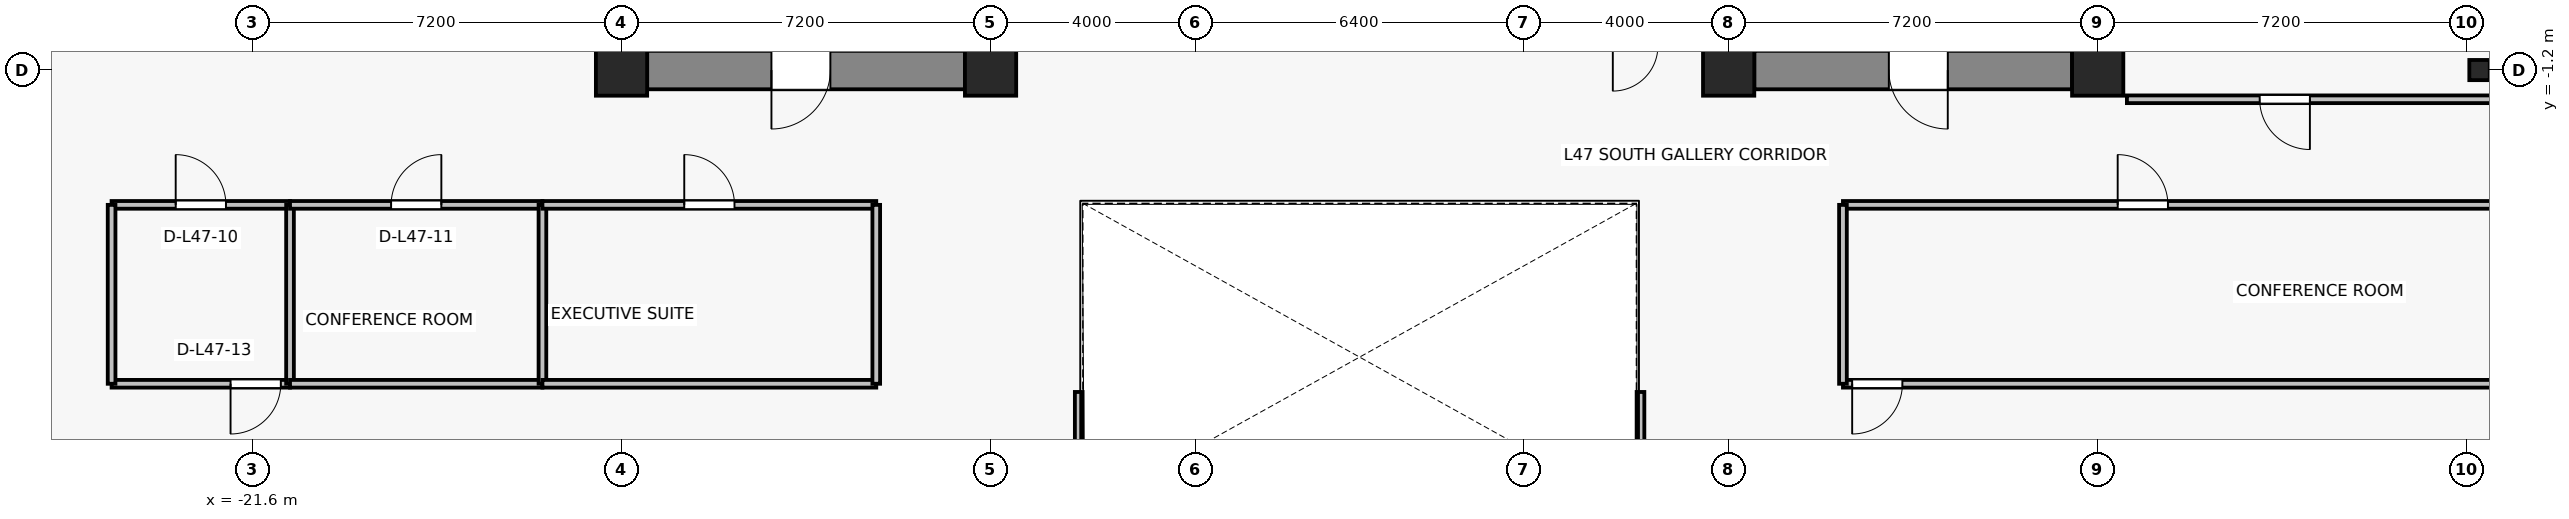
"""IFC4 building model, lengths in metres.
Left out: names, types, materials, properties, quantities, classifications, styles, units other than length and angle.
Written with IfcOpenShell. Run it as: python <this file> out.ifc"""

import sys

from ifc_helpers import new_model, si_unit, direction, frame, frame_2d, origin, origin_2d, place, context, subcontext, project, spatial, rectangle, i_section, extrude, source, transform, mapped, element, fill, save


model = new_model("IFC4")
c1 = context("Model", 3, precision=1e-05, world=origin(), true_north=direction((0.0, 1.0)))
c2 = subcontext(c1, "Body", "Model", "MODEL_VIEW")
j1 = project(units=[si_unit("LENGTHUNIT", "METRE"), si_unit("PLANEANGLEUNIT", "RADIAN")], contexts=[c1])
p1 = place(None, origin())
s1 = spatial("IfcSite", under=j1, at=p1, CompositionType="ELEMENT")
p2 = place(p1, origin())
s2 = spatial("IfcBuilding", under=s1, at=p2, CompositionType="ELEMENT")
p3 = place(p2, frame((0.0, 0.0, 169.3)))
s3 = spatial("IfcBuildingStorey", under=s2, at=p3, CompositionType="ELEMENT", Elevation=169.3)
for number, where, z_axis, x_axis in (
    (1, (-14.4, -1.2, 0.0), (0.0, 0.0, 1.0), (1.0, 0.0, 0.0)),
    (2, (-7.2, -1.2, 0.0), (0.0, 0.0, 1.0), (1.0, 0.0, 0.0)),
    (3, (7.2, -1.2, 0.0), (0.0, 0.0, 1.0), (1.0, 0.0, 0.0)),
    (4, (14.4, -1.2, 0.0), (0.0, 0.0, 1.0), (1.0, 0.0, 0.0)),
):
    element("IfcColumn", number, at=place(p3, frame(where, z_axis=z_axis, x_axis=x_axis)), inside=s3, PredefinedType="COLUMN", context=c2, shape_type="SweptSolid", body=[
        extrude(rectangle(XDim=1.0, YDim=1.0, at=origin_2d()), origin(), (0.0, 0.0, 1.0), 3.3),
    ])
p4 = place(p3, frame((21.85, -1.2, 0.0), z_axis=(0.0, 0.0, 1.0), x_axis=(1.0, 0.0, 0.0)))
e5 = element("IfcColumn", 5, at=p4, inside=s3, PredefinedType="COLUMN", context=c2, shape_type="SweptSolid", body=[
    extrude(i_section(OverallWidth=0.399, OverallDepth=0.394, WebThickness=0.023, FlangeThickness=0.037, FilletRadius=0.015, at=origin_2d()), origin(), (0.0, 0.0, 1.0), 3.3),
])
p5 = place(p3, frame((-7.7, -1.2, 0.0), z_axis=(0.0, 0.0, 1.0), x_axis=(-1.0, 0.0, 0.0)))
e6 = element("IfcWall", 6, at=p5, inside=s3, PredefinedType="SHEAR", context=c2, shape_type="SweptSolid", body=[
    extrude(rectangle(XDim=6.2, YDim=0.75, at=frame_2d((3.1, 0.0))), origin(), (0.0, 0.0, 1.0), 3.075),
])
p6 = place(p5, frame((2.625, 0.0, 0.0)))
e7 = element("IfcOpeningElement", 7, at=p6, cuts=e6, PredefinedType="OPENING", context=c2, shape_type="SweptSolid", body=[
    extrude(rectangle(XDim=1.15, YDim=2.15, at=frame_2d((0.575, 1.075))), frame((0.0, 0.385, 0.0), z_axis=(0.0, -1.0, 0.0), x_axis=(1.0, 0.0, 0.0)), (0.0, 0.0, 1.0), 0.77),
])
p7 = place(p3, frame((13.9, -1.2, 0.0), z_axis=(0.0, 0.0, 1.0), x_axis=(-1.0, 0.0, 0.0)))
e8 = element("IfcWall", 8, at=p7, inside=s3, PredefinedType="SHEAR", context=c2, shape_type="SweptSolid", body=[
    extrude(rectangle(XDim=6.2, YDim=0.75, at=frame_2d((3.1, 0.0))), origin(), (0.0, 0.0, 1.0), 3.075),
])
p8 = place(p7, frame((2.425, 0.0, 0.0)))
e9 = element("IfcOpeningElement", 9, at=p8, cuts=e8, PredefinedType="OPENING", context=c2, shape_type="SweptSolid", body=[
    extrude(rectangle(XDim=1.15, YDim=2.15, at=frame_2d((0.575, 1.075))), frame((0.0, 0.385, 0.0), z_axis=(0.0, -1.0, 0.0), x_axis=(1.0, 0.0, 0.0)), (0.0, 0.0, 1.0), 0.77),
])
p9 = place(p3, frame((-20.868, -7.32, 0.0), z_axis=(0.0, 0.0, 1.0), x_axis=(-1.0, 0.0, 0.0)))
e10 = element("IfcWall", 10, at=p9, inside=s3, PredefinedType="PARTITIONING", context=c2, shape_type="SweptSolid", body=[
    extrude(rectangle(XDim=3.481, YDim=0.15, at=frame_2d((1.74, 0.0))), origin(), (0.0, 0.0, 1.0), 2.565),
])
p10 = place(p9, frame((0.18, 0.0, 0.0)))
e11 = element("IfcOpeningElement", 11, at=p10, cuts=e10, PredefinedType="OPENING", context=c2, shape_type="SweptSolid", body=[
    extrude(rectangle(XDim=0.98, YDim=2.15, at=frame_2d((0.49, 1.075))), frame((0.0, 0.085, 0.0), z_axis=(0.0, -1.0, 0.0), x_axis=(1.0, 0.0, 0.0)), (0.0, 0.0, 1.0), 0.17),
])
p11 = place(p3, frame((-24.349, -3.83, 0.0), z_axis=(0.0, 0.0, 1.0), x_axis=(1.0, 0.0, 0.0)))
e12 = element("IfcWall", 12, at=p11, inside=s3, PredefinedType="PARTITIONING", context=c2, shape_type="SweptSolid", body=[
    extrude(rectangle(XDim=3.481, YDim=0.15, at=frame_2d((1.74, 0.0))), origin(), (0.0, 0.0, 1.0), 2.565),
])
p12 = place(p11, frame((1.25, 0.0, 0.0)))
e13 = element("IfcOpeningElement", 13, at=p12, cuts=e12, PredefinedType="OPENING", context=c2, shape_type="SweptSolid", body=[
    extrude(rectangle(XDim=0.98, YDim=2.15, at=frame_2d((0.49, 1.075))), frame((0.0, 0.085, 0.0), z_axis=(0.0, -1.0, 0.0), x_axis=(1.0, 0.0, 0.0)), (0.0, 0.0, 1.0), 0.17),
])
p13 = place(p3, frame((-24.349, -7.32, 0.0), z_axis=(0.0, 0.0, 1.0), x_axis=(0.0, 1.0, 0.0)))
e14 = element("IfcWall", 14, at=p13, inside=s3, PredefinedType="PARTITIONING", context=c2, shape_type="SweptSolid", body=[
    extrude(rectangle(XDim=3.49, YDim=0.15, at=frame_2d((1.745, 0.0))), origin(), (0.0, 0.0, 1.0), 3.075),
])
p14 = place(p3, frame((-20.868, -3.83, 0.0), z_axis=(0.0, 0.0, 1.0), x_axis=(0.0, -1.0, 0.0)))
e15 = element("IfcWall", 15, at=p14, inside=s3, PredefinedType="PARTITIONING", context=c2, shape_type="SweptSolid", body=[
    extrude(rectangle(XDim=3.49, YDim=0.15, at=frame_2d((1.745, 0.0))), origin(), (0.0, 0.0, 1.0), 2.665),
])
p15 = place(p3, frame((-15.943, -7.32, 0.0), z_axis=(0.0, 0.0, 1.0), x_axis=(-1.0, 0.0, 0.0)))
e16 = element("IfcWall", 16, at=p15, inside=s3, PredefinedType="PARTITIONING", context=c2, shape_type="SweptSolid", body=[
    extrude(rectangle(XDim=4.925, YDim=0.15, at=frame_2d((2.462, 0.0))), origin(), (0.0, 0.0, 1.0), 3.075),
])
p16 = place(p3, frame((-20.868, -3.83, 0.0), z_axis=(0.0, 0.0, 1.0), x_axis=(1.0, 0.0, 0.0)))
e17 = element("IfcWall", 17, at=p16, inside=s3, PredefinedType="PARTITIONING", context=c2, shape_type="SweptSolid", body=[
    extrude(rectangle(XDim=4.925, YDim=0.15, at=frame_2d((2.462, 0.0))), origin(), (0.0, 0.0, 1.0), 3.075),
])
p17 = place(p16, frame((1.973, 0.0, 0.0)))
e18 = element("IfcOpeningElement", 18, at=p17, cuts=e17, PredefinedType="OPENING", context=c2, shape_type="SweptSolid", body=[
    extrude(rectangle(XDim=0.98, YDim=2.15, at=frame_2d((0.49, 1.075))), frame((0.0, 0.085, 0.0), z_axis=(0.0, -1.0, 0.0), x_axis=(1.0, 0.0, 0.0)), (0.0, 0.0, 1.0), 0.17),
])
p18 = place(p3, frame((-15.943, -3.83, 0.0), z_axis=(0.0, 0.0, 1.0), x_axis=(0.0, -1.0, 0.0)))
e19 = element("IfcWall", 19, at=p18, inside=s3, PredefinedType="PARTITIONING", context=c2, shape_type="SweptSolid", body=[
    extrude(rectangle(XDim=3.49, YDim=0.15, at=frame_2d((1.745, 0.0))), origin(), (0.0, 0.0, 1.0), 2.665),
])
p19 = place(p3, frame((-9.43, -7.32, 0.0), z_axis=(0.0, 0.0, 1.0), x_axis=(-1.0, 0.0, 0.0)))
e20 = element("IfcWall", 20, at=p19, inside=s3, PredefinedType="PARTITIONING", context=c2, shape_type="SweptSolid", body=[
    extrude(rectangle(XDim=6.513, YDim=0.15, at=frame_2d((3.257, 0.0))), origin(), (0.0, 0.0, 1.0), 2.565),
])
p20 = place(p3, frame((-15.943, -3.83, 0.0), z_axis=(0.0, 0.0, 1.0), x_axis=(1.0, 0.0, 0.0)))
e21 = element("IfcWall", 21, at=p20, inside=s3, PredefinedType="PARTITIONING", context=c2, shape_type="SweptSolid", body=[
    extrude(rectangle(XDim=6.513, YDim=0.15, at=frame_2d((3.257, 0.0))), origin(), (0.0, 0.0, 1.0), 2.565),
])
p21 = place(p20, frame((2.767, 0.0, 0.0)))
e22 = element("IfcOpeningElement", 22, at=p21, cuts=e21, PredefinedType="OPENING", context=c2, shape_type="SweptSolid", body=[
    extrude(rectangle(XDim=0.98, YDim=2.15, at=frame_2d((0.49, 1.075))), frame((0.0, 0.085, 0.0), z_axis=(0.0, -1.0, 0.0), x_axis=(1.0, 0.0, 0.0)), (0.0, 0.0, 1.0), 0.17),
])
p22 = place(p3, frame((-9.43, -3.83, 0.0), z_axis=(0.0, 0.0, 1.0), x_axis=(0.0, -1.0, 0.0)))
e23 = element("IfcWall", 23, at=p22, inside=s3, PredefinedType="PARTITIONING", context=c2, shape_type="SweptSolid", body=[
    extrude(rectangle(XDim=3.49, YDim=0.15, at=frame_2d((1.745, 0.0))), origin(), (0.0, 0.0, 1.0), 2.665),
])
p23 = place(p3, frame((-5.48, -7.48, 0.0), z_axis=(0.0, 0.0, 1.0), x_axis=(0.0, -1.0, 0.0)))
e24 = element("IfcWall", 24, at=p23, inside=s3, PredefinedType="PARTITIONING", context=c2, shape_type="SweptSolid", body=[
    extrude(rectangle(XDim=9.85, YDim=0.15, at=frame_2d((4.925, 0.0))), origin(), (0.0, 0.0, 1.0), 2.565),
])
p24 = place(p3, frame((22.53, -7.32, 0.0), z_axis=(0.0, 0.0, 1.0), x_axis=(-1.0, 0.0, 0.0)))
e25 = element("IfcWall", 25, at=p24, inside=s3, PredefinedType="PARTITIONING", context=c2, shape_type="SweptSolid", body=[
    extrude(rectangle(XDim=13.1, YDim=0.15, at=frame_2d((6.55, 0.0))), origin(), (0.0, 0.0, 1.0), 2.565),
])
p25 = place(p24, frame((11.94, 0.0, 0.0)))
e26 = element("IfcOpeningElement", 26, at=p25, cuts=e25, PredefinedType="OPENING", context=c2, shape_type="SweptSolid", body=[
    extrude(rectangle(XDim=0.98, YDim=2.15, at=frame_2d((0.49, 1.075))), frame((0.0, 0.085, 0.0), z_axis=(0.0, -1.0, 0.0), x_axis=(1.0, 0.0, 0.0)), (0.0, 0.0, 1.0), 0.17),
])
p26 = place(p3, frame((9.43, -3.83, 0.0), z_axis=(0.0, 0.0, 1.0), x_axis=(1.0, 0.0, 0.0)))
e27 = element("IfcWall", 27, at=p26, inside=s3, PredefinedType="PARTITIONING", context=c2, shape_type="SweptSolid", body=[
    extrude(rectangle(XDim=13.1, YDim=0.15, at=frame_2d((6.55, 0.0))), origin(), (0.0, 0.0, 1.0), 2.565),
])
p27 = place(p26, frame((5.36, 0.0, 0.0)))
e28 = element("IfcOpeningElement", 28, at=p27, cuts=e27, PredefinedType="OPENING", context=c2, shape_type="SweptSolid", body=[
    extrude(rectangle(XDim=0.98, YDim=2.15, at=frame_2d((0.49, 1.075))), frame((0.0, 0.085, 0.0), z_axis=(0.0, -1.0, 0.0), x_axis=(1.0, 0.0, 0.0)), (0.0, 0.0, 1.0), 0.17),
])
p28 = place(p3, frame((9.43, -7.32, 0.0), z_axis=(0.0, 0.0, 1.0), x_axis=(0.0, 1.0, 0.0)))
e29 = element("IfcWall", 29, at=p28, inside=s3, PredefinedType="PARTITIONING", context=c2, shape_type="SweptSolid", body=[
    extrude(rectangle(XDim=3.49, YDim=0.15, at=frame_2d((1.745, 0.0))), origin(), (0.0, 0.0, 1.0), 2.665),
])
p29 = place(p3, frame((5.48, -17.33, 0.0), z_axis=(0.0, 0.0, 1.0), x_axis=(0.0, 1.0, 0.0)))
e30 = element("IfcWall", 30, at=p29, inside=s3, PredefinedType="PARTITIONING", context=c2, shape_type="SweptSolid", body=[
    extrude(rectangle(XDim=9.85, YDim=0.15, at=frame_2d((4.925, 0.0))), origin(), (0.0, 0.0, 1.0), 2.565),
])
p30 = place(p3, frame((22.53, -1.77, 0.0), z_axis=(0.0, 0.0, 1.0), x_axis=(-1.0, 0.0, 0.0)))
e31 = element("IfcWall", 31, at=p30, inside=s3, PredefinedType="PARTITIONING", context=c2, shape_type="SweptSolid", body=[
    extrude(rectangle(XDim=7.56, YDim=0.15, at=frame_2d((3.78, 0.0))), origin(), (0.0, 0.0, 1.0), 3.075),
])
p31 = place(p30, frame((3.99, 0.0, 0.0)))
e32 = element("IfcOpeningElement", 32, at=p31, cuts=e31, PredefinedType="OPENING", context=c2, shape_type="SweptSolid", body=[
    extrude(rectangle(XDim=0.98, YDim=2.15, at=frame_2d((0.49, 1.075))), frame((0.0, 0.085, 0.0), z_axis=(0.0, -1.0, 0.0), x_axis=(1.0, 0.0, 0.0)), (0.0, 0.0, 1.0), 0.17),
])
m1 = source(origin(), c2, "Body", "SweptSolid", [
    extrude(rectangle(XDim=1.15, YDim=2.15, at=frame_2d((0.575, 1.075))), frame((0.0, 0.025, 0.0), z_axis=(0.0, -1.0, 0.0), x_axis=(1.0, 0.0, 0.0)), (0.0, 0.0, 1.0), 0.05),
])
p32 = place(p6, origin())
e33 = element("IfcDoor", 33, at=p32, inside=s3, OperationType="SINGLE_SWING_RIGHT", PredefinedType="DOOR", context=c2, shape_type="MappedRepresentation", body=[
    mapped(m1, transform((0.0, 0.0, 0.0), x_axis=(1.0, 0.0, 0.0), y_axis=(0.0, 1.0, 0.0), z_axis=(0.0, 0.0, 1.0), scale=1.0)),
])
fill(e7, e33)
p33 = place(p8, origin())
e34 = element("IfcDoor", 34, at=p33, inside=s3, OperationType="SINGLE_SWING_LEFT", PredefinedType="DOOR", context=c2, shape_type="MappedRepresentation", body=[
    mapped(m1, transform((0.0, 0.0, 0.0), x_axis=(1.0, 0.0, 0.0), y_axis=(0.0, 1.0, 0.0), z_axis=(0.0, 0.0, 1.0), scale=1.0)),
])
fill(e9, e34)
m2 = source(origin(), c2, "Body", "SweptSolid", [
    extrude(rectangle(XDim=0.98, YDim=2.15, at=frame_2d((0.49, 1.075))), frame((0.0, 0.025, 0.0), z_axis=(0.0, -1.0, 0.0), x_axis=(1.0, 0.0, 0.0)), (0.0, 0.0, 1.0), 0.05),
])
p34 = place(p12, origin())
e35 = element("IfcDoor", 35, at=p34, inside=s3, OperationType="SINGLE_SWING_LEFT", PredefinedType="DOOR", context=c2, shape_type="MappedRepresentation", body=[
    mapped(m2, transform((0.0, 0.0, 0.0), x_axis=(1.0, 0.0, 0.0), y_axis=(0.0, 1.0, 0.0), z_axis=(0.0, 0.0, 1.0), scale=1.0)),
])
fill(e13, e35)
p35 = place(p17, origin())
e36 = element("IfcDoor", 36, at=p35, inside=s3, OperationType="SINGLE_SWING_RIGHT", PredefinedType="DOOR", context=c2, shape_type="MappedRepresentation", body=[
    mapped(m2, transform((0.0, 0.0, 0.0), x_axis=(1.0, 0.0, 0.0), y_axis=(0.0, 1.0, 0.0), z_axis=(0.0, 0.0, 1.0), scale=1.0)),
])
fill(e18, e36)
p36 = place(p21, origin())
e37 = element("IfcDoor", 37, at=p36, inside=s3, OperationType="SINGLE_SWING_LEFT", PredefinedType="DOOR", context=c2, shape_type="MappedRepresentation", body=[
    mapped(m2, transform((0.0, 0.0, 0.0), x_axis=(1.0, 0.0, 0.0), y_axis=(0.0, 1.0, 0.0), z_axis=(0.0, 0.0, 1.0), scale=1.0)),
])
fill(e22, e37)
p37 = place(p10, origin())
e38 = element("IfcDoor", 38, at=p37, inside=s3, OperationType="SINGLE_SWING_RIGHT", PredefinedType="DOOR", context=c2, shape_type="MappedRepresentation", body=[
    mapped(m2, transform((0.0, 0.0, 0.0), x_axis=(1.0, 0.0, 0.0), y_axis=(0.0, 1.0, 0.0), z_axis=(0.0, 0.0, 1.0), scale=1.0)),
])
fill(e11, e38)
p38 = place(p27, origin())
e39 = element("IfcDoor", 39, at=p38, inside=s3, OperationType="SINGLE_SWING_LEFT", PredefinedType="DOOR", context=c2, shape_type="MappedRepresentation", body=[
    mapped(m2, transform((0.0, 0.0, 0.0), x_axis=(1.0, 0.0, 0.0), y_axis=(0.0, 1.0, 0.0), z_axis=(0.0, 0.0, 1.0), scale=1.0)),
])
fill(e28, e39)
p39 = place(p25, origin())
e40 = element("IfcDoor", 40, at=p39, inside=s3, OperationType="SINGLE_SWING_RIGHT", PredefinedType="DOOR", context=c2, shape_type="MappedRepresentation", body=[
    mapped(m2, transform((0.0, 0.0, 0.0), x_axis=(1.0, 0.0, 0.0), y_axis=(0.0, 1.0, 0.0), z_axis=(0.0, 0.0, 1.0), scale=1.0)),
])
fill(e26, e40)
p40 = place(p31, origin())
e41 = element("IfcDoor", 41, at=p40, inside=s3, OperationType="SINGLE_SWING_LEFT", PredefinedType="DOOR", context=c2, shape_type="MappedRepresentation", body=[
    mapped(m2, transform((0.0, 0.0, 0.0), x_axis=(1.0, 0.0, 0.0), y_axis=(0.0, 1.0, 0.0), z_axis=(0.0, 0.0, 1.0), scale=1.0)),
])
fill(e32, e41)
save(model, sys.argv[1])
